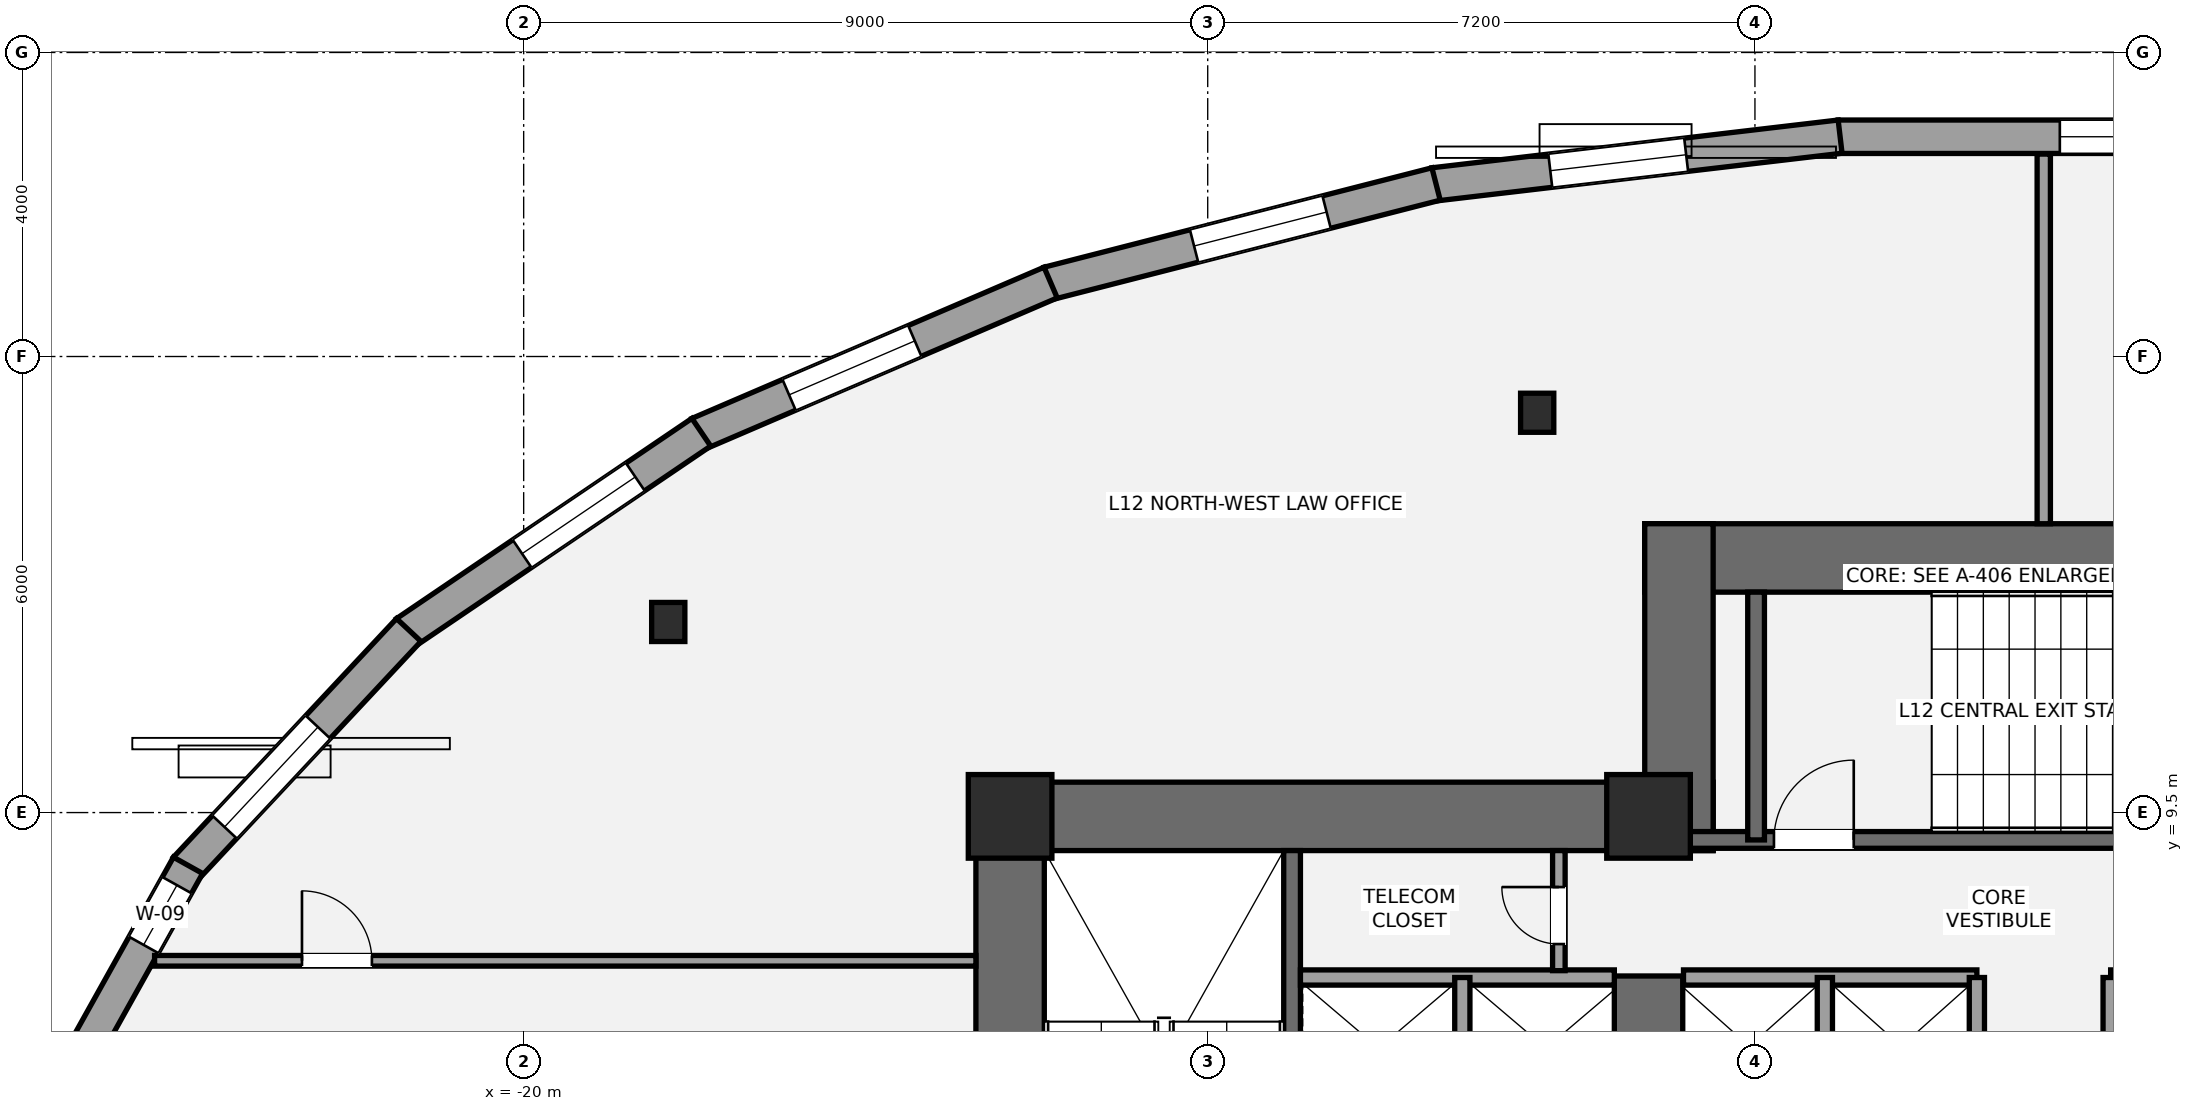
"""IFC4 building model, lengths in metres.
Left out: names, types, materials, properties, quantities, classifications, styles, units other than length and angle.
Written with IfcOpenShell. Run it as: python <this file> out.ifc"""

import sys

from ifc_helpers import new_model, si_unit, direction, frame, frame_2d, origin, origin_2d, place, context, subcontext, project, spatial, rectangle, i_section, extrude, element, fill, save


model = new_model("IFC4")
c1 = context("Model", 3, precision=1e-05, world=origin(), true_north=direction((0.0, 1.0)))
c2 = subcontext(c1, "Body", "Model", "MODEL_VIEW")
j1 = project(units=[si_unit("LENGTHUNIT", "METRE"), si_unit("PLANEANGLEUNIT", "RADIAN")], contexts=[c1])
p1 = place(None, origin())
s1 = spatial("IfcSite", under=j1, at=p1, CompositionType="ELEMENT")
p2 = place(p1, origin())
s2 = spatial("IfcBuilding", under=s1, at=p2, CompositionType="ELEMENT")
p3 = place(p2, frame((0.0, 0.0, 48.6)))
s3 = spatial("IfcBuildingStorey", under=s2, at=p3, CompositionType="ELEMENT", Elevation=48.6)
p4 = place(p3, frame((-13.6, 0.95, 0.0), z_axis=(0.0, 0.0, 1.0), x_axis=(0.0, 1.0, 0.0)))
e1 = element("IfcWall", 1, at=p4, inside=s3, PredefinedType="SHEAR", context=c2, shape_type="SweptSolid", body=[
    extrude(rectangle(XDim=8.95, YDim=0.9, at=frame_2d((4.475, 0.0))), origin(), (0.0, 0.0, 1.0), 3.6),
])
p5 = place(p3, frame((-14.05, 9.45, 0.0), z_axis=(0.0, 0.0, 1.0), x_axis=(1.0, 0.0, 0.0)))
e2 = element("IfcWall", 2, at=p5, inside=s3, PredefinedType="SHEAR", context=c2, shape_type="SweptSolid", body=[
    extrude(rectangle(XDim=9.7, YDim=0.9, at=frame_2d((4.85, 0.0))), origin(), (0.0, 0.0, 1.0), 3.6),
])
p6 = place(p3, frame((-5.2, 5.35, 0.0), z_axis=(0.0, 0.0, 1.0), x_axis=(0.0, 1.0, 0.0)))
e3 = element("IfcWall", 3, at=p6, inside=s3, PredefinedType="SHEAR", context=c2, shape_type="SweptSolid", body=[
    extrude(rectangle(XDim=2.0, YDim=0.9, at=frame_2d((1.0, 0.0))), origin(), (0.0, 0.0, 1.0), 3.6),
])
p7 = place(p3, frame((-9.89, 1.85, 0.0), z_axis=(0.0, 0.0, 1.0), x_axis=(0.0, 1.0, 0.0)))
e4 = element("IfcWall", 4, at=p7, inside=s3, PredefinedType="SHEAR", context=c2, shape_type="SweptSolid", body=[
    extrude(rectangle(XDim=7.15, YDim=0.22, at=frame_2d((3.575, 0.0))), origin(), (0.0, 0.0, 1.0), 3.6),
])
p8 = place(p3, frame((-5.25, 12.85, 0.0), z_axis=(0.0, 0.0, 1.0), x_axis=(1.0, 0.0, 0.0)))
e5 = element("IfcWall", 5, at=p8, inside=s3, PredefinedType="SHEAR", context=c2, shape_type="SweptSolid", body=[
    extrude(rectangle(XDim=10.5, YDim=0.9, at=frame_2d((5.25, 0.0))), origin(), (0.0, 0.0, 1.0), 3.6),
])
p9 = place(p3, frame((-4.8, 9.0, 0.0), z_axis=(0.0, 0.0, 1.0), x_axis=(0.0, 1.0, 0.0)))
e6 = element("IfcWall", 6, at=p9, inside=s3, PredefinedType="SHEAR", context=c2, shape_type="SweptSolid", body=[
    extrude(rectangle(XDim=4.3, YDim=0.9, at=frame_2d((2.15, 0.0))), origin(), (0.0, 0.0, 1.0), 3.6),
])
p10 = place(p3, frame((-4.7, 9.14, 0.0), z_axis=(0.0, 0.0, 1.0), x_axis=(1.0, 0.0, 0.0)))
e7 = element("IfcWall", 7, at=p10, inside=s3, PredefinedType="SHEAR", context=c2, shape_type="SweptSolid", body=[
    extrude(rectangle(XDim=9.3, YDim=0.22, at=frame_2d((4.65, 0.0))), origin(), (0.0, 0.0, 1.0), 3.6),
])
p11 = place(p10, frame((1.15, 0.0, 0.0)))
e8 = element("IfcOpeningElement", 8, at=p11, cuts=e7, PredefinedType="OPENING", context=c2, shape_type="SweptSolid", body=[
    extrude(rectangle(XDim=1.05, YDim=2.15, at=frame_2d((0.525, 1.075))), frame((0.0, 0.12, 0.0), z_axis=(0.0, -1.0, 0.0), x_axis=(1.0, 0.0, 0.0)), (0.0, 0.0, 1.0), 0.24),
])
p12 = place(p3, frame((-3.785, 9.14, 0.0), z_axis=(0.0, 0.0, 1.0), x_axis=(0.0, 1.0, 0.0)))
e9 = element("IfcWall", 9, at=p12, inside=s3, PredefinedType="SHEAR", context=c2, shape_type="SweptSolid", body=[
    extrude(rectangle(XDim=3.26, YDim=0.22, at=frame_2d((1.63, 0.0))), origin(), (0.0, 0.0, 1.0), 3.6),
])
for number, where, z_axis, x_axis in (
    (10, (-13.6, 9.45, 0.0), (0.0, 0.0, 1.0), (1.0, 0.0, 0.0)),
    (11, (-5.2, 9.45, 0.0), (0.0, 0.0, 1.0), (1.0, 0.0, 0.0)),
):
    element("IfcColumn", number, at=place(p3, frame(where, z_axis=z_axis, x_axis=x_axis)), inside=s3, PredefinedType="COLUMN", context=c2, shape_type="SweptSolid", body=[
        extrude(rectangle(XDim=1.1, YDim=1.1, at=origin_2d()), origin(), (0.0, 0.0, 1.0), 3.6),
    ])
for number, where, z_axis, x_axis in (
    (12, (-6.665, 14.76, 0.0), (0.0, 0.0, 1.0), (1.0, 0.0, 0.0)),
    (13, (-18.098, 12.007, 0.0), (0.0, 0.0, 1.0), (1.0, 0.0, 0.0)),
):
    element("IfcColumn", number, at=place(p3, frame(where, z_axis=z_axis, x_axis=x_axis)), inside=s3, PredefinedType="COLUMN", context=c2, shape_type="SweptSolid", body=[
        extrude(i_section(OverallWidth=0.437, OverallDepth=0.514, WebThickness=0.061, FlangeThickness=0.097, at=origin_2d()), origin(), (0.0, 0.0, 1.0), 3.6),
    ])
p13 = place(p3, frame((-2.705, 18.391, 0.0), z_axis=(0.0, 0.0, 1.0), x_axis=(1.0, 0.0, 0.0)))
e14 = element("IfcWall", 14, at=p13, inside=s3, PredefinedType="STANDARD", context=c2, shape_type="SweptSolid", body=[
    extrude(rectangle(XDim=5.41, YDim=0.44, at=frame_2d((2.705, 0.0))), origin(), (0.0, 0.0, 1.0), 2.529),
])
p14 = place(p13, frame((2.917, 0.0, 0.65)))
e15 = element("IfcOpeningElement", 15, at=p14, cuts=e14, PredefinedType="OPENING", context=c2, shape_type="SweptSolid", body=[
    extrude(rectangle(XDim=1.8, YDim=1.7, at=frame_2d((0.9, 0.85))), frame((0.0, 0.23, 0.0), z_axis=(0.0, -1.0, 0.0), x_axis=(1.0, 0.0, 0.0)), (0.0, 0.0, 1.0), 0.46),
])
p15 = place(p3, frame((-8.025, 17.764, 0.0), z_axis=(0.0, 0.0, 1.0), x_axis=(0.993159890371, 0.116762289112, 0.0)))
e16 = element("IfcWall", 16, at=p15, inside=s3, PredefinedType="STANDARD", context=c2, shape_type="SweptSolid", body=[
    extrude(rectangle(XDim=5.382, YDim=0.44, at=frame_2d((2.691, 0.0))), origin(), (0.0, 0.0, 1.0), 2.529),
])
p16 = place(p15, frame((1.542, 0.0, 0.65)))
e17 = element("IfcOpeningElement", 17, at=p16, cuts=e16, PredefinedType="OPENING", context=c2, shape_type="SweptSolid", body=[
    extrude(rectangle(XDim=1.8, YDim=1.7, at=frame_2d((0.9, 0.85))), frame((0.0, 0.23, 0.0), z_axis=(0.0, -1.0, 0.0), x_axis=(1.0, 0.0, 0.0)), (0.0, 0.0, 1.0), 0.46),
])
p17 = place(p3, frame((-13.099, 16.462, 0.0), z_axis=(0.0, 0.0, 1.0), x_axis=(0.968705592422, 0.248212560542, 0.0)))
e18 = element("IfcWall", 18, at=p17, inside=s3, PredefinedType="STANDARD", context=c2, shape_type="SweptSolid", body=[
    extrude(rectangle(XDim=5.268, YDim=0.44, at=frame_2d((2.634, 0.0))), origin(), (0.0, 0.0, 1.0), 2.529),
])
p18 = place(p17, frame((1.981, 0.0, 0.65)))
e19 = element("IfcOpeningElement", 19, at=p18, cuts=e18, PredefinedType="OPENING", context=c2, shape_type="SweptSolid", body=[
    extrude(rectangle(XDim=1.8, YDim=1.7, at=frame_2d((0.9, 0.85))), frame((0.0, 0.23, 0.0), z_axis=(0.0, -1.0, 0.0), x_axis=(1.0, 0.0, 0.0)), (0.0, 0.0, 1.0), 0.46),
])
p19 = place(p3, frame((-17.7, 14.483, 0.0), z_axis=(0.0, 0.0, 1.0), x_axis=(0.918881850071, 0.394532819433, 0.0)))
e20 = element("IfcWall", 20, at=p19, inside=s3, PredefinedType="STANDARD", context=c2, shape_type="SweptSolid", body=[
    extrude(rectangle(XDim=5.042, YDim=0.44, at=frame_2d((2.521, 0.0))), origin(), (0.0, 0.0, 1.0), 2.529),
])
p20 = place(p19, frame((1.297, 0.0, 0.65)))
e21 = element("IfcOpeningElement", 21, at=p20, cuts=e20, PredefinedType="OPENING", context=c2, shape_type="SweptSolid", body=[
    extrude(rectangle(XDim=1.8, YDim=1.7, at=frame_2d((0.9, 0.85))), frame((0.0, 0.23, 0.0), z_axis=(0.0, -1.0, 0.0), x_axis=(1.0, 0.0, 0.0)), (0.0, 0.0, 1.0), 0.46),
])
p21 = place(p3, frame((-21.549, 11.87, 0.0), z_axis=(0.0, 0.0, 1.0), x_axis=(0.827825981515, 0.560984976919, 0.0)))
e22 = element("IfcWall", 22, at=p21, inside=s3, PredefinedType="STANDARD", context=c2, shape_type="SweptSolid", body=[
    extrude(rectangle(XDim=4.695, YDim=0.44, at=frame_2d((2.347, 0.0))), origin(), (0.0, 0.0, 1.0), 2.529),
])
p22 = place(p21, frame((1.846, 0.0, 0.65)))
e23 = element("IfcOpeningElement", 23, at=p22, cuts=e22, PredefinedType="OPENING", context=c2, shape_type="SweptSolid", body=[
    extrude(rectangle(XDim=1.8, YDim=1.7, at=frame_2d((0.9, 0.85))), frame((0.0, 0.23, 0.0), z_axis=(0.0, -1.0, 0.0), x_axis=(1.0, 0.0, 0.0)), (0.0, 0.0, 1.0), 0.46),
])
p23 = place(p3, frame((-24.448, 8.763, 0.0), z_axis=(0.0, 0.0, 1.0), x_axis=(0.68299392258, 0.730424056093, 0.0)))
e24 = element("IfcWall", 24, at=p23, inside=s3, PredefinedType="STANDARD", context=c2, shape_type="SweptSolid", body=[
    extrude(rectangle(XDim=4.298, YDim=0.44, at=frame_2d((2.149, 0.0))), origin(), (0.0, 0.0, 1.0), 2.529),
])
p24 = place(p23, frame((0.75, 0.0, 0.65)))
e25 = element("IfcOpeningElement", 25, at=p24, cuts=e24, PredefinedType="OPENING", context=c2, shape_type="SweptSolid", body=[
    extrude(rectangle(XDim=1.8, YDim=1.7, at=frame_2d((0.9, 0.85))), frame((0.0, 0.23, 0.0), z_axis=(0.0, -1.0, 0.0), x_axis=(1.0, 0.0, 0.0)), (0.0, 0.0, 1.0), 0.46),
])
p25 = place(p3, frame((-26.346, 5.348, 0.0), z_axis=(0.0, 0.0, 1.0), x_axis=(0.487369438963, 0.873195871477, 0.0)))
e26 = element("IfcWall", 26, at=p25, inside=s3, PredefinedType="STANDARD", context=c2, shape_type="SweptSolid", body=[
    extrude(rectangle(XDim=3.96, YDim=0.44, at=frame_2d((1.98, 0.0))), origin(), (0.0, 0.0, 1.0), 2.529),
])
p26 = place(p25, frame((2.761, 0.0, 0.58)))
e27 = element("IfcOpeningElement", 27, at=p26, cuts=e26, PredefinedType="OPENING", context=c2, shape_type="SweptSolid", body=[
    extrude(rectangle(XDim=0.9, YDim=1.35, at=frame_2d((0.45, 0.675))), frame((0.0, 0.23, 0.0), z_axis=(0.0, -1.0, 0.0), x_axis=(1.0, 0.0, 0.0)), (0.0, 0.0, 1.0), 0.46),
])
p27 = place(p3, frame((-9.78, 7.33, 0.0), z_axis=(0.0, 0.0, 1.0), x_axis=(1.0, 0.0, 0.0)))
e28 = element("IfcWall", 28, at=p27, inside=s3, PredefinedType="SOLIDWALL", context=c2, shape_type="SweptSolid", body=[
    extrude(rectangle(XDim=4.13, YDim=0.2, at=frame_2d((2.065, 0.0))), origin(), (0.0, 0.0, 1.0), 3.4),
])
p28 = place(p3, frame((-7.65, 5.47, 0.0), z_axis=(0.0, 0.0, 1.0), x_axis=(0.0, 1.0, 0.0)))
e29 = element("IfcWall", 29, at=p28, inside=s3, PredefinedType="SOLIDWALL", context=c2, shape_type="SweptSolid", body=[
    extrude(rectangle(XDim=1.86, YDim=0.2, at=frame_2d((0.93, 0.0))), origin(), (0.0, 0.0, 1.0), 3.4),
])
for number, where, z_axis, x_axis in (
    (30, (-4.74, 7.33, 0.0), (0.0, 0.0, 1.0), (1.0, 0.0, 0.0)),
    (31, (0.88, 7.33, 0.0), (0.0, 0.0, 1.0), (1.0, 0.0, 0.0)),
):
    element("IfcWall", number, at=place(p3, frame(where, z_axis=z_axis, x_axis=x_axis)), inside=s3, PredefinedType="SOLIDWALL", context=c2, shape_type="SweptSolid", body=[
        extrude(rectangle(XDim=3.86, YDim=0.2, at=frame_2d((1.93, 0.0))), origin(), (0.0, 0.0, 1.0), 3.4),
    ])
for number, where, z_axis, x_axis in (
    (32, (-2.88, 5.52, 0.0), (0.0, 0.0, 1.0), (0.0, 1.0, 0.0)),
    (33, (-0.88, 5.52, 0.0), (0.0, 0.0, 1.0), (0.0, 1.0, 0.0)),
    (34, (0.88, 5.52, 0.0), (0.0, 0.0, 1.0), (0.0, 1.0, 0.0)),
):
    element("IfcWall", number, at=place(p3, frame(where, z_axis=z_axis, x_axis=x_axis)), inside=s3, PredefinedType="SOLIDWALL", context=c2, shape_type="SweptSolid", body=[
        extrude(rectangle(XDim=1.81, YDim=0.2, at=frame_2d((0.905, 0.0))), origin(), (0.0, 0.0, 1.0), 3.4),
    ])
p29 = place(p3, frame((-6.38, 7.42, 0.0), z_axis=(0.0, 0.0, 1.0), x_axis=(0.0, 1.0, 0.0)))
e35 = element("IfcWall", 35, at=p29, inside=s3, PredefinedType="PARTITIONING", context=c2, shape_type="SweptSolid", body=[
    extrude(rectangle(XDim=1.58, YDim=0.165, at=frame_2d((0.79, 0.0))), origin(), (0.0, 0.0, 1.0), 3.4),
])
p30 = place(p29, frame((0.35, 0.0, 0.0)))
e36 = element("IfcOpeningElement", 36, at=p30, cuts=e35, PredefinedType="OPENING", context=c2, shape_type="SweptSolid", body=[
    extrude(rectangle(XDim=0.75, YDim=2.1, at=frame_2d((0.375, 1.05))), frame((0.0, 0.093, 0.0), z_axis=(0.0, -1.0, 0.0), x_axis=(1.0, 0.0, 0.0)), (0.0, 0.0, 1.0), 0.185),
])
p31 = place(p3, frame((-24.856, 7.55, 0.0), z_axis=(0.0, 0.0, 1.0), x_axis=(1.0, 0.0, 0.0)))
e37 = element("IfcWall", 37, at=p31, inside=s3, PredefinedType="PARTITIONING", context=c2, shape_type="SweptSolid", body=[
    extrude(rectangle(XDim=10.806, YDim=0.14, at=frame_2d((5.403, 0.0))), origin(), (0.0, 0.0, 1.0), 2.853),
])
p32 = place(p31, frame((1.939, 0.0, 0.0)))
e38 = element("IfcOpeningElement", 38, at=p32, cuts=e37, PredefinedType="OPENING", context=c2, shape_type="SweptSolid", body=[
    extrude(rectangle(XDim=0.92, YDim=2.15, at=frame_2d((0.46, 1.075))), frame((0.0, 0.08, 0.0), z_axis=(0.0, -1.0, 0.0), x_axis=(1.0, 0.0, 0.0)), (0.0, 0.0, 1.0), 0.16),
])
p33 = place(p3, frame((0.0, 13.3, 0.0), z_axis=(0.0, 0.0, 1.0), x_axis=(0.0, 1.0, 0.0)))
e39 = element("IfcWall", 39, at=p33, inside=s3, PredefinedType="PARTITIONING", context=c2, shape_type="SweptSolid", body=[
    extrude(rectangle(XDim=4.863, YDim=0.175, at=frame_2d((2.432, 0.0))), origin(), (0.0, 0.0, 1.0), 3.4),
])
p34 = place(p14, origin())
e40 = element("IfcWindow", 40, at=p34, inside=s3, PartitioningType="SINGLE_PANEL", PredefinedType="WINDOW", context=c2, shape_type="SweptSolid", body=[
    extrude(rectangle(XDim=1.8, YDim=1.7, at=frame_2d((0.9, 0.85))), frame((0.0, -0.01, 0.0), z_axis=(0.0, -1.0, 0.0), x_axis=(1.0, 0.0, 0.0)), (0.0, 0.0, 1.0), 0.06),
])
fill(e15, e40)
p35 = place(p16, origin())
e41 = element("IfcWindow", 41, at=p35, inside=s3, PartitioningType="SINGLE_PANEL", PredefinedType="WINDOW", context=c2, shape_type="SweptSolid", body=[
    extrude(rectangle(XDim=1.8, YDim=1.7, at=frame_2d((0.9, 0.85))), frame((0.0, -0.01, 0.0), z_axis=(0.0, -1.0, 0.0), x_axis=(1.0, 0.0, 0.0)), (0.0, 0.0, 1.0), 0.06),
])
fill(e17, e41)
p36 = place(p18, origin())
e42 = element("IfcWindow", 42, at=p36, inside=s3, PartitioningType="SINGLE_PANEL", PredefinedType="WINDOW", context=c2, shape_type="SweptSolid", body=[
    extrude(rectangle(XDim=1.8, YDim=1.7, at=frame_2d((0.9, 0.85))), frame((0.0, -0.01, 0.0), z_axis=(0.0, -1.0, 0.0), x_axis=(1.0, 0.0, 0.0)), (0.0, 0.0, 1.0), 0.06),
])
fill(e19, e42)
p37 = place(p20, origin())
e43 = element("IfcWindow", 43, at=p37, inside=s3, PartitioningType="SINGLE_PANEL", PredefinedType="WINDOW", context=c2, shape_type="SweptSolid", body=[
    extrude(rectangle(XDim=1.8, YDim=1.7, at=frame_2d((0.9, 0.85))), frame((0.0, -0.01, 0.0), z_axis=(0.0, -1.0, 0.0), x_axis=(1.0, 0.0, 0.0)), (0.0, 0.0, 1.0), 0.06),
])
fill(e21, e43)
p38 = place(p22, origin())
e44 = element("IfcWindow", 44, at=p38, inside=s3, PartitioningType="SINGLE_PANEL", PredefinedType="WINDOW", context=c2, shape_type="SweptSolid", body=[
    extrude(rectangle(XDim=1.8, YDim=1.7, at=frame_2d((0.9, 0.85))), frame((0.0, -0.01, 0.0), z_axis=(0.0, -1.0, 0.0), x_axis=(1.0, 0.0, 0.0)), (0.0, 0.0, 1.0), 0.06),
])
fill(e23, e44)
p39 = place(p24, origin())
e45 = element("IfcWindow", 45, at=p39, inside=s3, PartitioningType="SINGLE_PANEL", PredefinedType="WINDOW", context=c2, shape_type="SweptSolid", body=[
    extrude(rectangle(XDim=1.8, YDim=1.7, at=frame_2d((0.9, 0.85))), frame((0.0, -0.01, 0.0), z_axis=(0.0, -1.0, 0.0), x_axis=(1.0, 0.0, 0.0)), (0.0, 0.0, 1.0), 0.06),
])
fill(e25, e45)
p40 = place(p26, origin())
e46 = element("IfcWindow", 46, at=p40, inside=s3, PartitioningType="SINGLE_PANEL", PredefinedType="WINDOW", context=c2, shape_type="SweptSolid", body=[
    extrude(rectangle(XDim=0.9, YDim=1.35, at=frame_2d((0.45, 0.675))), frame((0.0, -0.01, 0.0), z_axis=(0.0, -1.0, 0.0), x_axis=(1.0, 0.0, 0.0)), (0.0, 0.0, 1.0), 0.06),
])
fill(e27, e46)
p41 = place(p11, origin())
e47 = element("IfcDoor", 47, at=p41, inside=s3, OperationType="SINGLE_SWING_RIGHT", PredefinedType="DOOR", context=c2, shape_type="SweptSolid", body=[
    extrude(rectangle(XDim=1.05, YDim=2.15, at=frame_2d((0.525, 1.075))), frame((0.0, 0.025, 0.0), z_axis=(0.0, -1.0, 0.0), x_axis=(1.0, 0.0, 0.0)), (0.0, 0.0, 1.0), 0.05),
])
fill(e8, e47)
p42 = place(p30, origin())
e48 = element("IfcDoor", 48, at=p42, inside=s3, OperationType="SINGLE_SWING_RIGHT", PredefinedType="DOOR", context=c2, shape_type="SweptSolid", body=[
    extrude(rectangle(XDim=0.75, YDim=2.1, at=frame_2d((0.375, 1.05))), frame((0.0, 0.025, 0.0), z_axis=(0.0, -1.0, 0.0), x_axis=(1.0, 0.0, 0.0)), (0.0, 0.0, 1.0), 0.05),
])
fill(e36, e48)
p43 = place(p32, origin())
e49 = element("IfcDoor", 49, at=p43, inside=s3, OperationType="SINGLE_SWING_LEFT", PredefinedType="DOOR", context=c2, shape_type="SweptSolid", body=[
    extrude(rectangle(XDim=0.92, YDim=2.15, at=frame_2d((0.46, 1.075))), frame((0.0, 0.025, 0.0), z_axis=(0.0, -1.0, 0.0), x_axis=(1.0, 0.0, 0.0)), (0.0, 0.0, 1.0), 0.05),
])
fill(e38, e49)
save(model, sys.argv[1])
